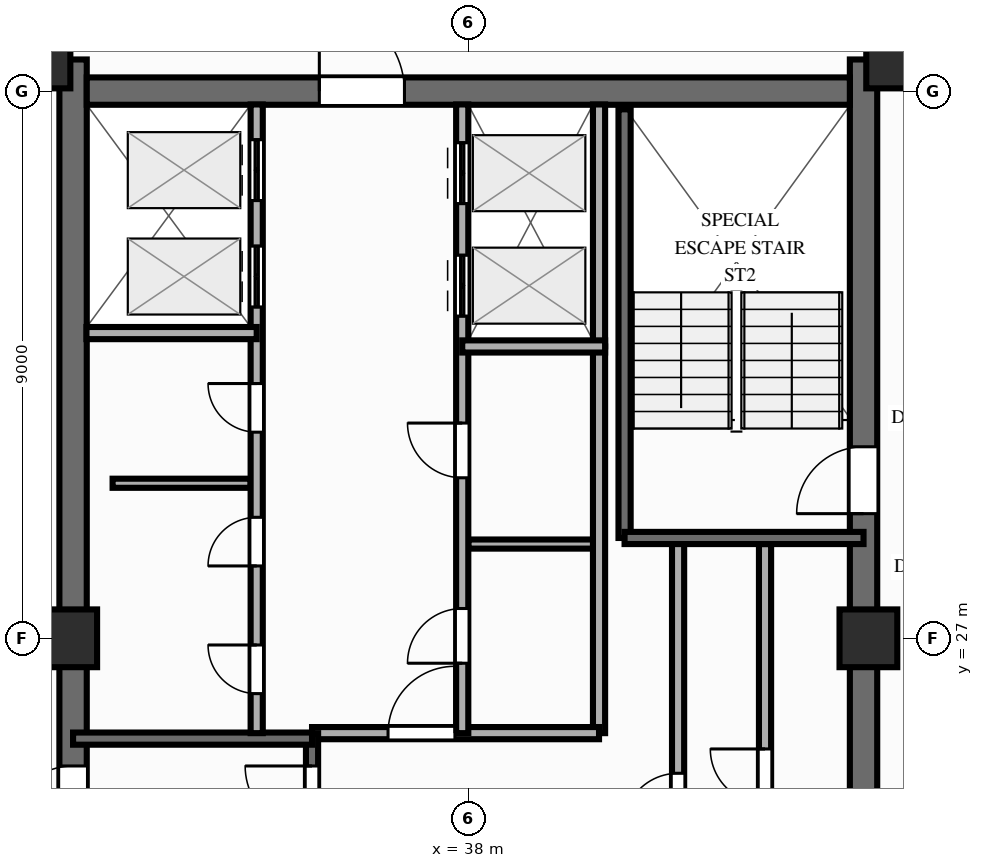
"""IFC4 building model, lengths in metres.
Left out: names, types, materials, properties, quantities, classifications, styles, units other than length and angle.
Written with IfcOpenShell. Run it as: python <this file> out.ifc"""

import sys

from ifc_helpers import new_model, si_unit, direction, frame, frame_2d, origin, origin_2d, place, context, subcontext, project, spatial, rectangle, extrude, source, transform, mapped, element, fill, save


model = new_model("IFC4")
c1 = context("Model", 3, precision=1e-05, world=origin(), true_north=direction((0.0, 1.0)))
c2 = subcontext(c1, "Body", "Model", "MODEL_VIEW")
j1 = project(units=[si_unit("LENGTHUNIT", "METRE"), si_unit("PLANEANGLEUNIT", "RADIAN")], contexts=[c1])
p1 = place(None, origin())
s1 = spatial("IfcSite", under=j1, at=p1, CompositionType="ELEMENT")
p2 = place(p1, origin())
s2 = spatial("IfcBuilding", under=s1, at=p2, CompositionType="ELEMENT")
p3 = place(p2, frame((0.0, 0.0, 243.0)))
s3 = spatial("IfcBuildingStorey", under=s2, at=p3, CompositionType="ELEMENT", Elevation=243.0)
p4 = place(p3, frame((31.5, 17.48, 0.0), z_axis=(0.0, 0.0, 1.0), x_axis=(0.0, 1.0, 0.0)))
e1 = element("IfcWall", 1, at=p4, inside=s3, PredefinedType="SHEAR", context=c2, shape_type="SweptSolid", body=[
    extrude(rectangle(XDim=19.04, YDim=0.45, at=frame_2d((9.52, 0.0))), origin(), (0.0, 0.0, 1.0), 3.0),
])
p5 = place(p4, frame((6.32, 0.0, 0.0)))
e2 = element("IfcOpeningElement", 2, at=p5, cuts=e1, PredefinedType="OPENING", context=c2, shape_type="SweptSolid", body=[
    extrude(rectangle(XDim=1.1, YDim=2.15, at=frame_2d((0.55, 1.075))), frame((0.0, 0.237, 0.0), z_axis=(0.0, -1.0, 0.0), x_axis=(1.0, 0.0, 0.0)), (0.0, 0.0, 1.0), 0.474),
])
p6 = place(p3, frame((44.5, 17.48, 0.0), z_axis=(0.0, 0.0, 1.0), x_axis=(0.0, 1.0, 0.0)))
e3 = element("IfcWall", 3, at=p6, inside=s3, PredefinedType="SHEAR", context=c2, shape_type="SweptSolid", body=[
    extrude(rectangle(XDim=19.04, YDim=0.45, at=frame_2d((9.52, 0.0))), origin(), (0.0, 0.0, 1.0), 3.0),
])
p7 = place(p6, frame((12.67, 0.0, 0.0), z_axis=(0.0, 0.0, 1.0), x_axis=(-1.0, 0.0, 0.0)))
e4 = element("IfcOpeningElement", 4, at=p7, cuts=e3, PredefinedType="OPENING", context=c2, shape_type="SweptSolid", body=[
    extrude(rectangle(XDim=1.1, YDim=2.15, at=frame_2d((0.55, 1.075))), frame((0.0, 0.237, 0.0), z_axis=(0.0, -1.0, 0.0), x_axis=(1.0, 0.0, 0.0)), (0.0, 0.0, 1.0), 0.474),
])
p8 = place(p3, frame((31.725, 36.0, 0.0), z_axis=(0.0, 0.0, 1.0), x_axis=(1.0, 0.0, 0.0)))
e5 = element("IfcWall", 5, at=p8, inside=s3, PredefinedType="SHEAR", context=c2, shape_type="SweptSolid", body=[
    extrude(rectangle(XDim=12.55, YDim=0.45, at=frame_2d((6.275, 0.0))), origin(), (0.0, 0.0, 1.0), 3.0),
])
p9 = place(p8, frame((5.225, 0.0, 0.0), z_axis=(0.0, 0.0, 1.0), x_axis=(-1.0, 0.0, 0.0)))
e6 = element("IfcOpeningElement", 6, at=p9, cuts=e5, PredefinedType="OPENING", context=c2, shape_type="SweptSolid", body=[
    extrude(rectangle(XDim=1.4, YDim=2.15, at=frame_2d((0.7, 1.075))), frame((0.0, 0.237, 0.0), z_axis=(0.0, -1.0, 0.0), x_axis=(1.0, 0.0, 0.0)), (0.0, 0.0, 1.0), 0.474),
])
m1 = source(origin(), c2, "Body", "SweptSolid", [
    extrude(rectangle(XDim=0.95, YDim=0.95, at=origin_2d()), origin(), (0.0, 0.0, 1.0), 3.0),
])
for number, where, z_axis, x_axis in (
    (7, (30.98, 36.52, 0.0), (0.0, 0.0, 1.0), (1.0, 0.0, 0.0)),
    (8, (45.02, 36.52, 0.0), (0.0, 0.0, 1.0), (1.0, 0.0, 0.0)),
    (9, (31.42, 27.0, 0.0), (0.0, 0.0, 1.0), (1.0, 0.0, 0.0)),
    (10, (44.58, 27.0, 0.0), (0.0, 0.0, 1.0), (1.0, 0.0, 0.0)),
):
    element("IfcColumn", number, at=place(p3, frame(where, z_axis=z_axis, x_axis=x_axis)), inside=s3, PredefinedType="COLUMN", context=c2, shape_type="MappedRepresentation", body=[
        mapped(m1, transform((0.0, 0.0, 0.0), scale=1.0)),
    ])
p10 = place(p3, frame((32.15, 29.55, 0.0), z_axis=(0.0, 0.0, 1.0), x_axis=(1.0, 0.0, 0.0)))
e11 = element("IfcWall", 11, at=p10, inside=s3, PredefinedType="PARTITIONING", context=c2, shape_type="SweptSolid", body=[
    extrude(rectangle(XDim=2.27, YDim=0.15, at=frame_2d((1.135, 0.0))), origin(), (0.0, 0.0, 1.0), 2.79),
])
p11 = place(p3, frame((38.0, 28.55, 0.0), z_axis=(0.0, 0.0, 1.0), x_axis=(1.0, 0.0, 0.0)))
e12 = element("IfcWall", 12, at=p11, inside=s3, PredefinedType="PARTITIONING", context=c2, shape_type="SweptSolid", body=[
    extrude(rectangle(XDim=2.2, YDim=0.15, at=frame_2d((1.1, 0.0))), origin(), (0.0, 0.0, 1.0), 2.14),
])
p12 = place(p3, frame((42.88, 21.08, 0.0), z_axis=(0.0, 0.0, 1.0), x_axis=(0.0, 1.0, 0.0)))
e13 = element("IfcWall", 13, at=p12, inside=s3, PredefinedType="PARTITIONING", context=c2, shape_type="SweptSolid", body=[
    extrude(rectangle(XDim=7.47, YDim=0.2, at=frame_2d((3.735, 0.0))), origin(), (0.0, 0.0, 1.0), 2.79),
])
p13 = place(p12, frame((3.2, 0.0, 0.0)))
e14 = element("IfcOpeningElement", 14, at=p13, cuts=e13, PredefinedType="OPENING", context=c2, shape_type="SweptSolid", body=[
    extrude(rectangle(XDim=0.9, YDim=2.1, at=frame_2d((0.45, 1.05))), frame((0.0, 0.112, 0.0), z_axis=(0.0, -1.0, 0.0), x_axis=(1.0, 0.0, 0.0)), (0.0, 0.0, 1.0), 0.224),
])
p14 = place(p3, frame((41.45, 21.08, 0.0), z_axis=(0.0, 0.0, 1.0), x_axis=(0.0, 1.0, 0.0)))
e15 = element("IfcWall", 15, at=p14, inside=s3, PredefinedType="PARTITIONING", context=c2, shape_type="SweptSolid", body=[
    extrude(rectangle(XDim=7.52, YDim=0.2, at=frame_2d((3.76, 0.0))), origin(), (0.0, 0.0, 1.0), 2.79),
])
p15 = place(p14, frame((2.8, 0.0, 0.0)))
e16 = element("IfcOpeningElement", 16, at=p15, cuts=e15, PredefinedType="OPENING", context=c2, shape_type="SweptSolid", body=[
    extrude(rectangle(XDim=0.9, YDim=2.1, at=frame_2d((0.45, 1.05))), frame((0.0, 0.112, 0.0), z_axis=(0.0, -1.0, 0.0), x_axis=(1.0, 0.0, 0.0)), (0.0, 0.0, 1.0), 0.224),
])
p16 = place(p3, frame((40.15, 25.44, 0.0), z_axis=(0.0, 0.0, 1.0), x_axis=(0.0, 1.0, 0.0)))
e17 = element("IfcWall", 17, at=p16, inside=s3, PredefinedType="PARTITIONING", context=c2, shape_type="SweptSolid", body=[
    extrude(rectangle(XDim=6.36, YDim=0.2, at=frame_2d((3.18, 0.0))), origin(), (0.0, 0.0, 1.0), 2.79),
])
p17 = place(p3, frame((40.15, 31.8, 0.0), z_axis=(0.0, 0.0, 1.0), x_axis=(0.0, 1.0, 0.0)))
e18 = element("IfcWall", 18, at=p17, inside=s3, PredefinedType="PARTITIONING", context=c2, shape_type="SweptSolid", body=[
    extrude(rectangle(XDim=3.98, YDim=0.2, at=frame_2d((1.99, 0.0))), origin(), (0.0, 0.0, 1.0), 2.79),
])
p18 = place(p3, frame((35.43, 25.44, 0.0), z_axis=(0.0, 0.0, 1.0), x_axis=(1.0, 0.0, 0.0)))
e19 = element("IfcWall", 19, at=p18, inside=s3, PredefinedType="PARTITIONING", context=c2, shape_type="SweptSolid", body=[
    extrude(rectangle(XDim=4.72, YDim=0.2, at=frame_2d((2.36, 0.0))), origin(), (0.0, 0.0, 1.0), 2.79),
])
p19 = place(p18, frame((1.25, 0.0, 0.0)))
e20 = element("IfcOpeningElement", 20, at=p19, cuts=e19, PredefinedType="OPENING", context=c2, shape_type="SweptSolid", body=[
    extrude(rectangle(XDim=1.1, YDim=2.15, at=frame_2d((0.55, 1.075))), frame((0.0, 0.112, 0.0), z_axis=(0.0, -1.0, 0.0), x_axis=(1.0, 0.0, 0.0)), (0.0, 0.0, 1.0), 0.224),
])
p20 = place(p3, frame((35.43, 18.22, 0.0), z_axis=(0.0, 0.0, 1.0), x_axis=(0.0, 1.0, 0.0)))
e21 = element("IfcWall", 21, at=p20, inside=s3, PredefinedType="SOLIDWALL", context=c2, shape_type="SweptSolid", body=[
    extrude(rectangle(XDim=7.22, YDim=0.2, at=frame_2d((3.61, 0.0))), origin(), (0.0, 0.0, 1.0), 2.79),
])
p21 = place(p20, frame((6.68, 0.0, 0.0), z_axis=(0.0, 0.0, 1.0), x_axis=(-1.0, 0.0, 0.0)))
e22 = element("IfcOpeningElement", 22, at=p21, cuts=e21, PredefinedType="OPENING", context=c2, shape_type="SweptSolid", body=[
    extrude(rectangle(XDim=1.1, YDim=2.15, at=frame_2d((0.55, 1.075))), frame((0.0, 0.112, 0.0), z_axis=(0.0, -1.0, 0.0), x_axis=(1.0, 0.0, 0.0)), (0.0, 0.0, 1.0), 0.224),
])
p22 = place(p3, frame((31.5, 25.35, 0.0), z_axis=(0.0, 0.0, 1.0), x_axis=(1.0, 0.0, 0.0)))
e23 = element("IfcWall", 23, at=p22, inside=s3, PredefinedType="SOLIDWALL", context=c2, shape_type="SweptSolid", body=[
    extrude(rectangle(XDim=3.93, YDim=0.2, at=frame_2d((1.965, 0.0))), origin(), (0.0, 0.0, 1.0), 2.79),
])
p23 = place(p3, frame((40.57, 28.65, 0.0), z_axis=(0.0, 0.0, 1.0), x_axis=(0.0, 1.0, 0.0)))
e24 = element("IfcWall", 24, at=p23, inside=s3, PredefinedType="SOLIDWALL", context=c2, shape_type="SweptSolid", body=[
    extrude(rectangle(XDim=7.05, YDim=0.2, at=frame_2d((3.525, 0.0))), origin(), (0.0, 0.0, 1.0), 2.79),
])
p24 = place(p3, frame((40.57, 28.65, 0.0), z_axis=(0.0, 0.0, 1.0), x_axis=(1.0, 0.0, 0.0)))
e25 = element("IfcWall", 25, at=p24, inside=s3, PredefinedType="SOLIDWALL", context=c2, shape_type="SweptSolid", body=[
    extrude(rectangle(XDim=3.93, YDim=0.2, at=frame_2d((1.965, 0.0))), origin(), (0.0, 0.0, 1.0), 2.79),
])
p25 = place(p3, frame((34.52, 25.44, 0.0), z_axis=(0.0, 0.0, 1.0), x_axis=(0.0, 1.0, 0.0)))
e26 = element("IfcWall", 26, at=p25, inside=s3, PredefinedType="PARTITIONING", context=c2, shape_type="SweptSolid", body=[
    extrude(rectangle(XDim=10.34, YDim=0.2, at=frame_2d((5.17, 0.0))), origin(), (0.0, 0.0, 1.0), 2.79),
])
p26 = place(p25, frame((0.65, 0.0, 0.0)))
e27 = element("IfcOpeningElement", 27, at=p26, cuts=e26, PredefinedType="OPENING", context=c2, shape_type="SweptSolid", body=[
    extrude(rectangle(XDim=0.8, YDim=2.05, at=frame_2d((0.4, 1.025))), frame((0.0, 0.112, 0.0), z_axis=(0.0, -1.0, 0.0), x_axis=(1.0, 0.0, 0.0)), (0.0, 0.0, 1.0), 0.224),
])
p27 = place(p25, frame((2.75, 0.0, 0.0)))
e28 = element("IfcOpeningElement", 28, at=p27, cuts=e26, PredefinedType="OPENING", context=c2, shape_type="SweptSolid", body=[
    extrude(rectangle(XDim=0.8, YDim=2.05, at=frame_2d((0.4, 1.025))), frame((0.0, 0.112, 0.0), z_axis=(0.0, -1.0, 0.0), x_axis=(1.0, 0.0, 0.0)), (0.0, 0.0, 1.0), 0.224),
])
p28 = place(p25, frame((4.95, 0.0, 0.0)))
e29 = element("IfcOpeningElement", 29, at=p28, cuts=e26, PredefinedType="OPENING", context=c2, shape_type="SweptSolid", body=[
    extrude(rectangle(XDim=0.8, YDim=2.05, at=frame_2d((0.4, 1.025))), frame((0.0, 0.112, 0.0), z_axis=(0.0, -1.0, 0.0), x_axis=(1.0, 0.0, 0.0)), (0.0, 0.0, 1.0), 0.224),
])
p29 = place(p25, frame((7.01, 0.0, 0.0)))
e30 = element("IfcOpeningElement", 30, at=p29, cuts=e26, PredefinedType="OPENING", context=c2, shape_type="SweptSolid", body=[
    extrude(rectangle(XDim=1.0, YDim=2.15, at=frame_2d((0.5, 1.075))), frame((0.0, 0.112, 0.0), z_axis=(0.0, -1.0, 0.0), x_axis=(1.0, 0.0, 0.0)), (0.0, 0.0, 1.0), 0.224),
])
p30 = place(p25, frame((8.76, 0.0, 0.0)))
e31 = element("IfcOpeningElement", 31, at=p30, cuts=e26, PredefinedType="OPENING", context=c2, shape_type="SweptSolid", body=[
    extrude(rectangle(XDim=1.0, YDim=2.15, at=frame_2d((0.5, 1.075))), frame((0.0, 0.112, 0.0), z_axis=(0.0, -1.0, 0.0), x_axis=(1.0, 0.0, 0.0)), (0.0, 0.0, 1.0), 0.224),
])
p31 = place(p3, frame((31.72, 32.02, 0.0), z_axis=(0.0, 0.0, 1.0), x_axis=(1.0, 0.0, 0.0)))
e32 = element("IfcWall", 32, at=p31, inside=s3, PredefinedType="PARTITIONING", context=c2, shape_type="SweptSolid", body=[
    extrude(rectangle(XDim=2.8, YDim=0.2, at=frame_2d((1.4, 0.0))), origin(), (0.0, 0.0, 1.0), 2.79),
])
p32 = place(p3, frame((37.9, 25.44, 0.0), z_axis=(0.0, 0.0, 1.0), x_axis=(0.0, 1.0, 0.0)))
e33 = element("IfcWall", 33, at=p32, inside=s3, PredefinedType="PARTITIONING", context=c2, shape_type="SweptSolid", body=[
    extrude(rectangle(XDim=10.34, YDim=0.2, at=frame_2d((5.17, 0.0))), origin(), (0.0, 0.0, 1.0), 2.79),
])
p33 = place(p32, frame((1.15, 0.0, 0.0)))
e34 = element("IfcOpeningElement", 34, at=p33, cuts=e33, PredefinedType="OPENING", context=c2, shape_type="SweptSolid", body=[
    extrude(rectangle(XDim=0.9, YDim=2.1, at=frame_2d((0.45, 1.05))), frame((0.0, 0.112, 0.0), z_axis=(0.0, -1.0, 0.0), x_axis=(1.0, 0.0, 0.0)), (0.0, 0.0, 1.0), 0.224),
])
p34 = place(p32, frame((4.2, 0.0, 0.0)))
e35 = element("IfcOpeningElement", 35, at=p34, cuts=e33, PredefinedType="OPENING", context=c2, shape_type="SweptSolid", body=[
    extrude(rectangle(XDim=0.9, YDim=2.1, at=frame_2d((0.45, 1.05))), frame((0.0, 0.112, 0.0), z_axis=(0.0, -1.0, 0.0), x_axis=(1.0, 0.0, 0.0)), (0.0, 0.0, 1.0), 0.224),
])
p35 = place(p32, frame((6.86, 0.0, 0.0)))
e36 = element("IfcOpeningElement", 36, at=p35, cuts=e33, PredefinedType="OPENING", context=c2, shape_type="SweptSolid", body=[
    extrude(rectangle(XDim=1.0, YDim=2.15, at=frame_2d((0.5, 1.075))), frame((0.0, 0.112, 0.0), z_axis=(0.0, -1.0, 0.0), x_axis=(1.0, 0.0, 0.0)), (0.0, 0.0, 1.0), 0.224),
])
p36 = place(p32, frame((8.71, 0.0, 0.0)))
e37 = element("IfcOpeningElement", 37, at=p36, cuts=e33, PredefinedType="OPENING", context=c2, shape_type="SweptSolid", body=[
    extrude(rectangle(XDim=1.0, YDim=2.15, at=frame_2d((0.5, 1.075))), frame((0.0, 0.112, 0.0), z_axis=(0.0, -1.0, 0.0), x_axis=(1.0, 0.0, 0.0)), (0.0, 0.0, 1.0), 0.224),
])
p37 = place(p3, frame((37.9, 31.8, 0.0), z_axis=(0.0, 0.0, 1.0), x_axis=(1.0, 0.0, 0.0)))
e38 = element("IfcWall", 38, at=p37, inside=s3, PredefinedType="PARTITIONING", context=c2, shape_type="SweptSolid", body=[
    extrude(rectangle(XDim=2.35, YDim=0.2, at=frame_2d((1.175, 0.0))), origin(), (0.0, 0.0, 1.0), 2.79),
])
m2 = source(origin(), c2, "Body", "SweptSolid", [
    extrude(rectangle(XDim=1.1, YDim=2.15, at=frame_2d((0.55, 1.075))), frame((0.0, 0.025, 0.0), z_axis=(0.0, -1.0, 0.0), x_axis=(1.0, 0.0, 0.0)), (0.0, 0.0, 1.0), 0.05),
])
p38 = place(p5, origin())
e39 = element("IfcDoor", 39, at=p38, inside=s3, OperationType="SINGLE_SWING_LEFT", PredefinedType="DOOR", context=c2, shape_type="MappedRepresentation", body=[
    mapped(m2, transform((0.0, 0.0, 0.0), scale=1.0)),
])
fill(e2, e39)
p39 = place(p7, origin())
e40 = element("IfcDoor", 40, at=p39, inside=s3, OperationType="SINGLE_SWING_RIGHT", PredefinedType="DOOR", context=c2, shape_type="MappedRepresentation", body=[
    mapped(m2, transform((0.0, 0.0, 0.0), scale=1.0)),
])
fill(e4, e40)
m3 = source(origin(), c2, "Body", "SweptSolid", [
    extrude(rectangle(XDim=1.4, YDim=2.15, at=frame_2d((0.7, 1.075))), frame((0.0, 0.025, 0.0), z_axis=(0.0, -1.0, 0.0), x_axis=(1.0, 0.0, 0.0)), (0.0, 0.0, 1.0), 0.05),
])
p40 = place(p9, origin())
e41 = element("IfcDoor", 41, at=p40, inside=s3, OperationType="SINGLE_SWING_RIGHT", PredefinedType="DOOR", context=c2, shape_type="MappedRepresentation", body=[
    mapped(m3, transform((0.0, 0.0, 0.0), scale=1.0)),
])
fill(e6, e41)
m4 = source(origin(), c2, "Body", "SweptSolid", [
    extrude(rectangle(XDim=0.9, YDim=2.1, at=frame_2d((0.45, 1.05))), frame((0.0, 0.025, 0.0), z_axis=(0.0, -1.0, 0.0), x_axis=(1.0, 0.0, 0.0)), (0.0, 0.0, 1.0), 0.05),
])
p41 = place(p13, origin())
e42 = element("IfcDoor", 42, at=p41, inside=s3, OperationType="SINGLE_SWING_RIGHT", PredefinedType="DOOR", context=c2, shape_type="MappedRepresentation", body=[
    mapped(m4, transform((0.0, 0.0, 0.0), scale=1.0)),
])
fill(e14, e42)
p42 = place(p15, origin())
e43 = element("IfcDoor", 43, at=p42, inside=s3, OperationType="SINGLE_SWING_LEFT", PredefinedType="DOOR", context=c2, shape_type="MappedRepresentation", body=[
    mapped(m4, transform((0.0, 0.0, 0.0), scale=1.0)),
])
fill(e16, e43)
p43 = place(p19, origin())
e44 = element("IfcDoor", 44, at=p43, inside=s3, OperationType="SINGLE_SWING_RIGHT", PredefinedType="DOOR", context=c2, shape_type="MappedRepresentation", body=[
    mapped(m2, transform((0.0, 0.0, 0.0), scale=1.0)),
])
fill(e20, e44)
p44 = place(p21, origin())
e45 = element("IfcDoor", 45, at=p44, inside=s3, OperationType="SINGLE_SWING_LEFT", PredefinedType="DOOR", context=c2, shape_type="MappedRepresentation", body=[
    mapped(m2, transform((0.0, 0.0, 0.0), scale=1.0)),
])
fill(e22, e45)
m5 = source(origin(), c2, "Body", "SweptSolid", [
    extrude(rectangle(XDim=0.8, YDim=2.05, at=frame_2d((0.4, 1.025))), frame((0.0, 0.025, 0.0), z_axis=(0.0, -1.0, 0.0), x_axis=(1.0, 0.0, 0.0)), (0.0, 0.0, 1.0), 0.05),
])
p45 = place(p26, origin())
e46 = element("IfcDoor", 46, at=p45, inside=s3, OperationType="SINGLE_SWING_RIGHT", PredefinedType="DOOR", context=c2, shape_type="MappedRepresentation", body=[
    mapped(m5, transform((0.0, 0.0, 0.0), scale=1.0)),
])
fill(e27, e46)
p46 = place(p27, origin())
e47 = element("IfcDoor", 47, at=p46, inside=s3, OperationType="SINGLE_SWING_LEFT", PredefinedType="DOOR", context=c2, shape_type="MappedRepresentation", body=[
    mapped(m5, transform((0.0, 0.0, 0.0), scale=1.0)),
])
fill(e28, e47)
p47 = place(p28, origin())
e48 = element("IfcDoor", 48, at=p47, inside=s3, OperationType="SINGLE_SWING_RIGHT", PredefinedType="DOOR", context=c2, shape_type="MappedRepresentation", body=[
    mapped(m5, transform((0.0, 0.0, 0.0), scale=1.0)),
])
fill(e29, e48)
m6 = source(origin(), c2, "Body", "SweptSolid", [
    extrude(rectangle(XDim=1.0, YDim=2.15, at=frame_2d((0.5, 1.075))), frame((0.0, 0.025, 0.0), z_axis=(0.0, -1.0, 0.0), x_axis=(1.0, 0.0, 0.0)), (0.0, 0.0, 1.0), 0.05),
])
p48 = place(p29, origin())
e49 = element("IfcDoor", 49, at=p48, inside=s3, OperationType="DOUBLE_DOOR_SLIDING", PredefinedType="DOOR", context=c2, shape_type="MappedRepresentation", body=[
    mapped(m6, transform((0.0, 0.0, 0.0), scale=1.0)),
])
fill(e30, e49)
p49 = place(p30, origin())
e50 = element("IfcDoor", 50, at=p49, inside=s3, OperationType="DOUBLE_DOOR_SLIDING", PredefinedType="DOOR", context=c2, shape_type="MappedRepresentation", body=[
    mapped(m6, transform((0.0, 0.0, 0.0), scale=1.0)),
])
fill(e31, e50)
p50 = place(p33, origin())
e51 = element("IfcDoor", 51, at=p50, inside=s3, OperationType="SINGLE_SWING_LEFT", PredefinedType="DOOR", context=c2, shape_type="MappedRepresentation", body=[
    mapped(m4, transform((0.0, 0.0, 0.0), scale=1.0)),
])
fill(e34, e51)
p51 = place(p34, origin())
e52 = element("IfcDoor", 52, at=p51, inside=s3, OperationType="SINGLE_SWING_RIGHT", PredefinedType="DOOR", context=c2, shape_type="MappedRepresentation", body=[
    mapped(m4, transform((0.0, 0.0, 0.0), scale=1.0)),
])
fill(e35, e52)
p52 = place(p35, origin())
e53 = element("IfcDoor", 53, at=p52, inside=s3, OperationType="DOUBLE_DOOR_SLIDING", PredefinedType="DOOR", context=c2, shape_type="MappedRepresentation", body=[
    mapped(m6, transform((0.0, 0.0, 0.0), scale=1.0)),
])
fill(e36, e53)
p53 = place(p36, origin())
e54 = element("IfcDoor", 54, at=p53, inside=s3, OperationType="DOUBLE_DOOR_SLIDING", PredefinedType="DOOR", context=c2, shape_type="MappedRepresentation", body=[
    mapped(m6, transform((0.0, 0.0, 0.0), scale=1.0)),
])
fill(e37, e54)
save(model, sys.argv[1])
